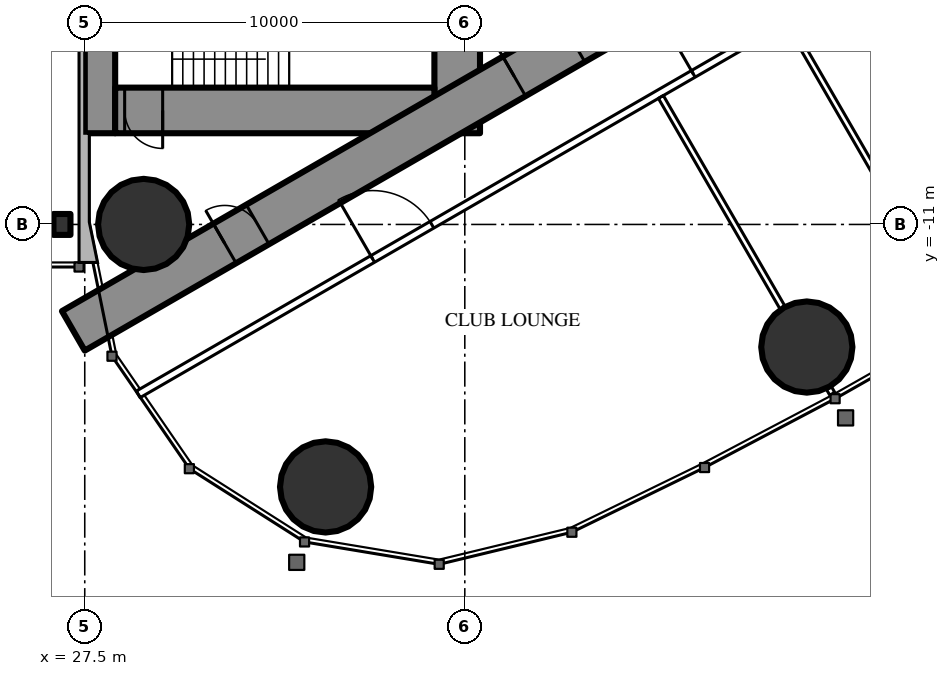
"""IFC4 building model, lengths in metres.
Left out: names, types, materials, properties, quantities, classifications, styles, units other than length and angle.
Written with IfcOpenShell. Run it as: python <this file> out.ifc"""

import sys

from ifc_helpers import new_model, si_unit, direction, frame, frame_2d, origin, origin_2d, place, context, subcontext, project, spatial, rectangle, circle, i_section, extrude, element, fill, save


model = new_model("IFC4")
c1 = context("Model", 3, precision=1e-05, world=origin(), true_north=direction((0.0, 1.0)))
c2 = subcontext(c1, "Body", "Model", "MODEL_VIEW")
j1 = project(units=[si_unit("LENGTHUNIT", "METRE"), si_unit("PLANEANGLEUNIT", "RADIAN")], contexts=[c1])
p1 = place(None, origin())
s1 = spatial("IfcSite", under=j1, at=p1, CompositionType="ELEMENT")
p2 = place(p1, origin())
s2 = spatial("IfcBuilding", under=s1, at=p2, CompositionType="ELEMENT")
p3 = place(p2, frame((0.0, 0.0, 247.7)))
s3 = spatial("IfcBuildingStorey", under=s2, at=p3, CompositionType="ELEMENT", Elevation=247.7)
for number, where, z_axis, x_axis in (
    (1, (33.837, -17.906, 0.0), (0.0, 0.0, 1.0), (1.0, 0.0, 0.0)),
    (2, (29.05, -11.0, 0.0), (0.0, 0.0, 1.0), (1.0, 0.0, 0.0)),
    (3, (46.499, -14.226, 0.0), (0.0, 0.0, 1.0), (1.0, 0.0, 0.0)),
):
    element("IfcColumn", number, at=place(p3, frame(where, z_axis=z_axis, x_axis=x_axis)), inside=s3, PredefinedType="COLUMN", context=c2, shape_type="SweptSolid", body=[
        extrude(circle(Radius=1.2, at=origin_2d()), origin(), (0.0, 0.0, 1.0), 4.2),
    ])
p4 = place(p3, frame((27.9, -8.6, 0.0), z_axis=(0.0, 0.0, 1.0), x_axis=(0.0, 1.0, 0.0)))
e4 = element("IfcWall", 4, at=p4, inside=s3, PredefinedType="SHEAR", context=c2, shape_type="SweptSolid", body=[
    extrude(rectangle(XDim=17.2, YDim=0.8, at=frame_2d((8.6, 0.0))), origin(), (0.0, 0.0, 1.0), 4.2),
])
p5 = place(p4, frame((9.35, 0.0, 0.0)))
e5 = element("IfcOpeningElement", 5, at=p5, cuts=e4, PredefinedType="OPENING", context=c2, shape_type="SweptSolid", body=[
    extrude(rectangle(XDim=0.9, YDim=2.2, at=frame_2d((0.45, 1.1))), frame((0.0, 0.41, 0.0), z_axis=(0.0, -1.0, 0.0), x_axis=(1.0, 0.0, 0.0)), (0.0, 0.0, 1.0), 0.82),
])
p6 = place(p3, frame((37.3, -8.6, 0.0), z_axis=(0.0, 0.0, 1.0), x_axis=(0.0, 1.0, 0.0)))
e6 = element("IfcWall", 6, at=p6, inside=s3, PredefinedType="SHEAR", context=c2, shape_type="SweptSolid", body=[
    extrude(rectangle(XDim=17.2, YDim=1.2, at=frame_2d((8.6, 0.0))), origin(), (0.0, 0.0, 1.0), 4.2),
])
p7 = place(p6, frame((7.7, 0.0, 0.0)))
e7 = element("IfcOpeningElement", 7, at=p7, cuts=e6, PredefinedType="OPENING", context=c2, shape_type="SweptSolid", body=[
    extrude(rectangle(XDim=1.8, YDim=2.2, at=frame_2d((0.9, 1.1))), frame((0.0, 0.61, 0.0), z_axis=(0.0, -1.0, 0.0), x_axis=(1.0, 0.0, 0.0)), (0.0, 0.0, 1.0), 1.22),
])
p8 = place(p3, frame((28.3, -8.0, 0.0), z_axis=(0.0, 0.0, 1.0), x_axis=(1.0, 0.0, 0.0)))
e8 = element("IfcWall", 8, at=p8, inside=s3, PredefinedType="SHEAR", context=c2, shape_type="SweptSolid", body=[
    extrude(rectangle(XDim=8.4, YDim=1.2, at=frame_2d((4.2, 0.0))), origin(), (0.0, 0.0, 1.0), 4.2),
])
p9 = place(p8, frame((0.25, 0.0, 0.0)))
e9 = element("IfcOpeningElement", 9, at=p9, cuts=e8, PredefinedType="OPENING", context=c2, shape_type="SweptSolid", body=[
    extrude(rectangle(XDim=1.0, YDim=2.2, at=frame_2d((0.5, 1.1))), frame((0.0, 0.61, 0.0), z_axis=(0.0, -1.0, 0.0), x_axis=(1.0, 0.0, 0.0)), (0.0, 0.0, 1.0), 1.22),
])
p10 = place(p3, frame((27.2, -13.8, 0.0), z_axis=(0.0, 0.0, 1.0), x_axis=(0.866027159892, 0.499996958321, 0.0)))
e10 = element("IfcWall", 10, at=p10, inside=s3, PredefinedType="SHEAR", context=c2, shape_type="SweptSolid", body=[
    extrude(rectangle(XDim=27.947, YDim=1.2, at=frame_2d((13.973, 0.0))), origin(), (0.0, 0.0, 1.0), 4.2),
])
p11 = place(p10, frame((4.6, 0.0, 0.0)))
e11 = element("IfcOpeningElement", 11, at=p11, cuts=e10, PredefinedType="OPENING", context=c2, shape_type="SweptSolid", body=[
    extrude(rectangle(XDim=1.0, YDim=2.2, at=frame_2d((0.5, 1.1))), frame((0.0, 0.61, 0.0), z_axis=(0.0, -1.0, 0.0), x_axis=(1.0, 0.0, 0.0)), (0.0, 0.0, 1.0), 1.22),
])
p12 = place(p10, frame((13.395, 0.0, 0.0)))
e12 = element("IfcOpeningElement", 12, at=p12, cuts=e10, PredefinedType="OPENING", context=c2, shape_type="SweptSolid", body=[
    extrude(rectangle(XDim=1.8, YDim=2.2, at=frame_2d((0.9, 1.1))), frame((0.0, 0.61, 0.0), z_axis=(0.0, -1.0, 0.0), x_axis=(1.0, 0.0, 0.0)), (0.0, 0.0, 1.0), 1.22),
])
p13 = place(p3, frame((26.9, -11.0, 0.0), z_axis=(0.0, 0.0, 1.0), x_axis=(1.0, 0.0, 0.0)))
e13 = element("IfcColumn", 13, at=p13, inside=s3, PredefinedType="COLUMN", context=c2, shape_type="SweptSolid", body=[
    extrude(i_section(OverallWidth=0.448, OverallDepth=0.55, WebThickness=0.072, FlangeThickness=0.115, FilletRadius=0.02, at=origin_2d()), origin(), (0.0, 0.0, 1.0), 4.2),
])
p14 = place(p3, frame((28.907, -15.47, 0.0), z_axis=(0.0, 0.0, 1.0), x_axis=(0.866023700353, 0.500002950419, 0.0)))
e14 = element("IfcWall", 14, at=p14, inside=s3, PredefinedType="PARTITIONING", context=c2, shape_type="SweptSolid", body=[
    extrude(rectangle(XDim=30.941, YDim=0.2, at=frame_2d((15.47, 0.0))), origin(), (0.0, 0.0, 1.0), 3.95),
])
p15 = place(p14, frame((7.124, 0.0, 0.0)))
e15 = element("IfcOpeningElement", 15, at=p15, cuts=e14, PredefinedType="OPENING", context=c2, shape_type="SweptSolid", body=[
    extrude(rectangle(XDim=1.8, YDim=2.2, at=frame_2d((0.9, 1.1))), frame((0.0, 0.11, 0.0), z_axis=(0.0, -1.0, 0.0), x_axis=(1.0, 0.0, 0.0)), (0.0, 0.0, 1.0), 0.22),
])
p16 = place(p14, frame((16.865, 0.0, 0.0)))
e16 = element("IfcOpeningElement", 16, at=p16, cuts=e14, PredefinedType="OPENING", context=c2, shape_type="SweptSolid", body=[
    extrude(rectangle(XDim=1.8, YDim=2.2, at=frame_2d((0.9, 1.1))), frame((0.0, 0.11, 0.0), z_axis=(0.0, -1.0, 0.0), x_axis=(1.0, 0.0, 0.0)), (0.0, 0.0, 1.0), 0.22),
])
p17 = place(p14, frame((20.748, 0.0, 0.0)))
e17 = element("IfcOpeningElement", 17, at=p17, cuts=e14, PredefinedType="OPENING", context=c2, shape_type="SweptSolid", body=[
    extrude(rectangle(XDim=1.8, YDim=2.2, at=frame_2d((0.9, 1.1))), frame((0.0, 0.11, 0.0), z_axis=(0.0, -1.0, 0.0), x_axis=(1.0, 0.0, 0.0)), (0.0, 0.0, 1.0), 0.22),
])
p18 = place(p14, frame((26.252, 0.0, 0.0)))
e18 = element("IfcOpeningElement", 18, at=p18, cuts=e14, PredefinedType="OPENING", context=c2, shape_type="SweptSolid", body=[
    extrude(rectangle(XDim=1.8, YDim=2.2, at=frame_2d((0.9, 1.1))), frame((0.0, 0.11, 0.0), z_axis=(0.0, -1.0, 0.0), x_axis=(1.0, 0.0, 0.0)), (0.0, 0.0, 1.0), 0.22),
])
p19 = place(p3, frame((42.66, -7.646, 0.0), z_axis=(0.0, 0.0, 1.0), x_axis=(0.499996592859, -0.866027370889, 0.0)))
e19 = element("IfcWall", 19, at=p19, inside=s3, PredefinedType="PARTITIONING", context=c2, shape_type="SweptSolid", body=[
    extrude(rectangle(XDim=6.398, YDim=0.15, at=frame_2d((3.199, 0.0))), origin(), (0.0, 0.0, 1.0), 3.05),
])
p20 = place(p3, frame((47.079, -15.3, 0.0), z_axis=(0.0, 0.0, 1.0), x_axis=(0.499212083968, -0.866479829667, 0.0)))
e20 = element("IfcWall", 20, at=p20, inside=s3, PredefinedType="PARTITIONING", context=c2, shape_type="SweptSolid", body=[
    extrude(rectangle(XDim=0.179, YDim=0.15, at=frame_2d((0.09, 0.0))), origin(), (0.0, 0.0, 1.0), 3.05),
])
p21 = place(p3, frame((46.023, -5.704, 0.0), z_axis=(0.0, 0.0, 1.0), x_axis=(0.499984478165, -0.866034365135, 0.0)))
e21 = element("IfcWall", 21, at=p21, inside=s3, PredefinedType="PARTITIONING", context=c2, shape_type="SweptSolid", body=[
    extrude(rectangle(XDim=6.426, YDim=0.15, at=frame_2d((3.213, 0.0))), origin(), (0.0, 0.0, 1.0), 3.05),
])
p22 = place(p15, origin())
e22 = element("IfcDoor", 22, at=p22, inside=s3, OperationType="DOUBLE_DOOR_SINGLE_SWING", PredefinedType="DOOR", context=c2, shape_type="SweptSolid", body=[
    extrude(rectangle(XDim=1.8, YDim=2.2, at=frame_2d((0.9, 1.1))), frame((0.0, 0.025, 0.0), z_axis=(0.0, -1.0, 0.0), x_axis=(1.0, 0.0, 0.0)), (0.0, 0.0, 1.0), 0.05),
])
fill(e15, e22)
p23 = place(p16, origin())
e23 = element("IfcDoor", 23, at=p23, inside=s3, OperationType="DOUBLE_DOOR_SINGLE_SWING", PredefinedType="DOOR", context=c2, shape_type="SweptSolid", body=[
    extrude(rectangle(XDim=1.8, YDim=2.2, at=frame_2d((0.9, 1.1))), frame((0.0, 0.025, 0.0), z_axis=(0.0, -1.0, 0.0), x_axis=(1.0, 0.0, 0.0)), (0.0, 0.0, 1.0), 0.05),
])
fill(e16, e23)
p24 = place(p11, origin())
e24 = element("IfcDoor", 24, at=p24, inside=s3, OperationType="SINGLE_SWING_LEFT", PredefinedType="DOOR", context=c2, shape_type="SweptSolid", body=[
    extrude(rectangle(XDim=1.0, YDim=2.2, at=frame_2d((0.5, 1.1))), frame((0.0, 0.025, 0.0), z_axis=(0.0, -1.0, 0.0), x_axis=(1.0, 0.0, 0.0)), (0.0, 0.0, 1.0), 0.05),
])
fill(e11, e24)
p25 = place(p12, origin())
e25 = element("IfcDoor", 25, at=p25, inside=s3, OperationType="DOUBLE_DOOR_SINGLE_SWING", PredefinedType="DOOR", context=c2, shape_type="SweptSolid", body=[
    extrude(rectangle(XDim=1.8, YDim=2.2, at=frame_2d((0.9, 1.1))), frame((0.0, 0.025, 0.0), z_axis=(0.0, -1.0, 0.0), x_axis=(1.0, 0.0, 0.0)), (0.0, 0.0, 1.0), 0.05),
])
fill(e12, e25)
p26 = place(p9, origin())
e26 = element("IfcDoor", 26, at=p26, inside=s3, OperationType="SINGLE_SWING_RIGHT", PredefinedType="DOOR", context=c2, shape_type="SweptSolid", body=[
    extrude(rectangle(XDim=1.0, YDim=2.2, at=frame_2d((0.5, 1.1))), frame((0.0, 0.025, 0.0), z_axis=(0.0, -1.0, 0.0), x_axis=(1.0, 0.0, 0.0)), (0.0, 0.0, 1.0), 0.05),
])
fill(e9, e26)
save(model, sys.argv[1])
